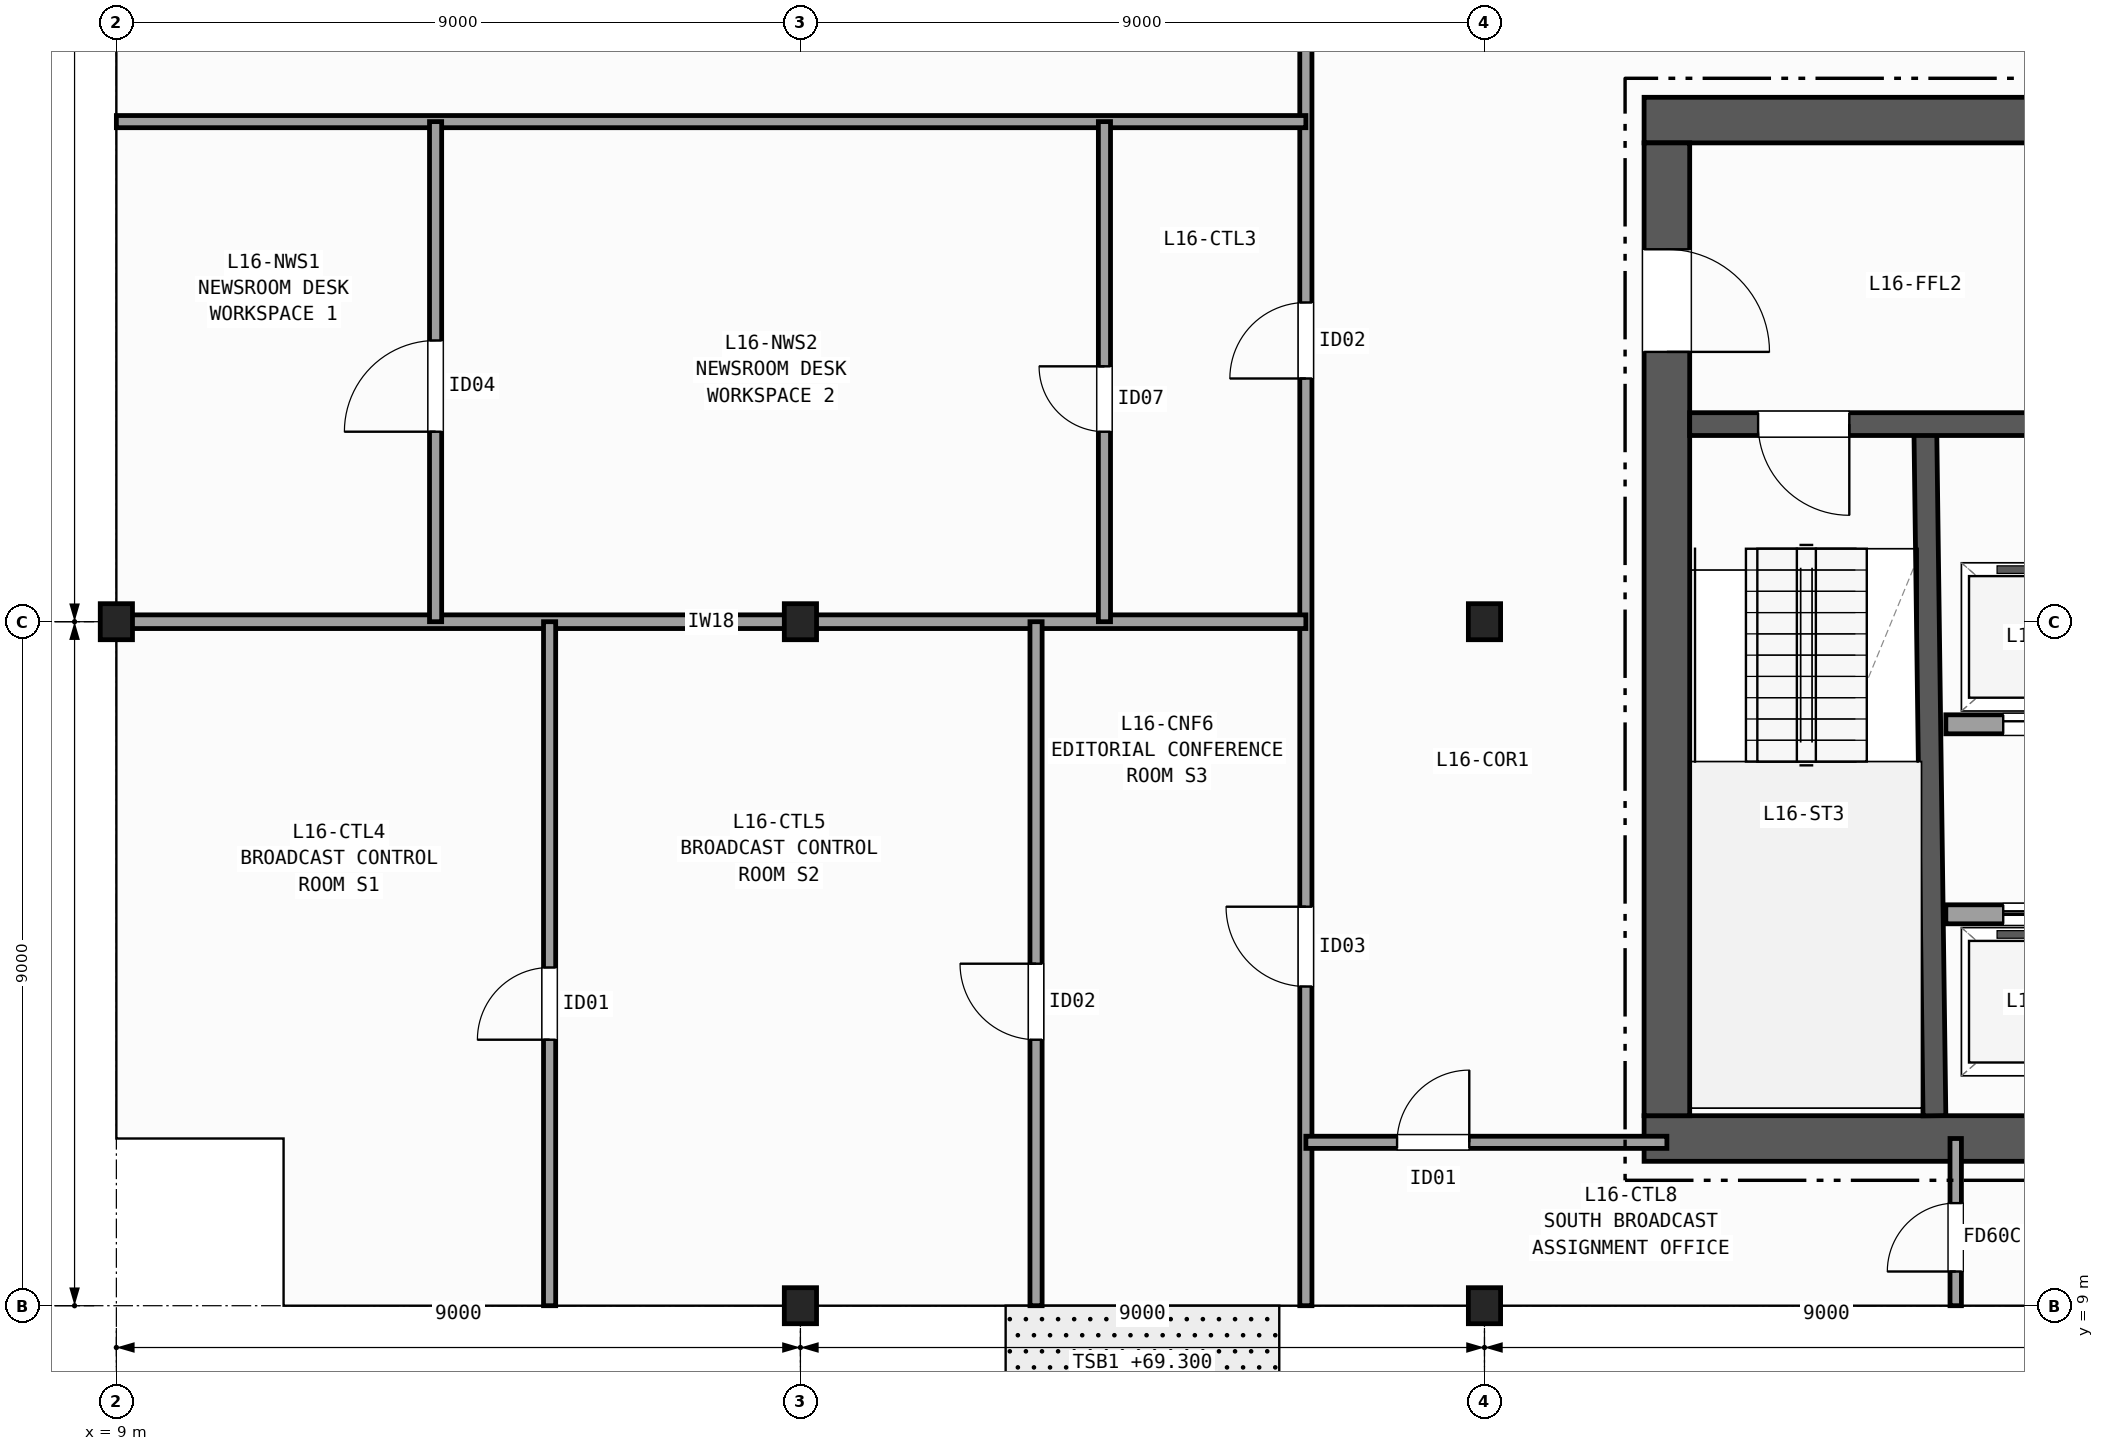
"""IFC4 building model, lengths in metres.
Left out: names, types, materials, properties, quantities, classifications, styles, units other than length and angle.
Written with IfcOpenShell. Run it as: python <this file> out.ifc"""

import sys

from ifc_helpers import new_model, si_unit, direction, frame, frame_2d, origin, origin_2d, place, context, subcontext, project, spatial, rectangle, i_section, extrude, element, fill, save


model = new_model("IFC4")
c1 = context("Model", 3, precision=1e-05, world=origin(), true_north=direction((0.0, 1.0)))
c2 = subcontext(c1, "Body", "Model", "MODEL_VIEW")
j1 = project(units=[si_unit("LENGTHUNIT", "METRE"), si_unit("PLANEANGLEUNIT", "RADIAN")], contexts=[c1])
p1 = place(None, origin())
s1 = spatial("IfcSite", under=j1, at=p1, CompositionType="ELEMENT")
p2 = place(p1, origin())
s2 = spatial("IfcBuilding", under=s1, at=p2, CompositionType="ELEMENT")
p3 = place(p2, frame((0.0, 0.0, 69.3)))
s3 = spatial("IfcBuildingStorey", under=s2, at=p3, CompositionType="ELEMENT", Elevation=69.3)
for number, where, z_axis, x_axis in (
    (1, (9.0, 18.0, 0.0), (0.0, 0.0, 1.0), (1.0, 0.0, 0.0)),
    (2, (18.0, 9.0, 0.0), (0.0, 0.0, 1.0), (1.0, 0.0, 0.0)),
    (3, (18.0, 18.0, 0.0), (0.0, 0.0, 1.0), (1.0, 0.0, 0.0)),
    (4, (27.0, 9.0, 0.0), (0.0, 0.0, 1.0), (1.0, 0.0, 0.0)),
    (5, (27.0, 18.0, 0.0), (0.0, 0.0, 1.0), (1.0, 0.0, 0.0)),
):
    element("IfcColumn", number, at=place(p3, frame(where, z_axis=z_axis, x_axis=x_axis)), inside=s3, PredefinedType="COLUMN", context=c2, shape_type="SweptSolid", body=[
        extrude(i_section(OverallWidth=0.424, OverallDepth=0.474, WebThickness=0.048, FlangeThickness=0.077, FilletRadius=0.015, at=origin_2d()), origin(), (0.0, 0.0, 1.0), 3.7),
    ])
p4 = place(p3, frame((29.1, 11.2, 0.0), z_axis=(0.0, 0.0, 1.0), x_axis=(1.0, 0.0, 0.0)))
e6 = element("IfcWall", 6, at=p4, inside=s3, PredefinedType="SHEAR", context=c2, shape_type="SweptSolid", body=[
    extrude(rectangle(XDim=14.0, YDim=0.6, at=frame_2d((7.0, 0.0))), origin(), (0.0, 0.0, 1.0), 3.42),
])
p5 = place(p3, frame((43.1, 24.6, 0.0), z_axis=(0.0, 0.0, 1.0), x_axis=(-1.0, 0.0, 0.0)))
e7 = element("IfcWall", 7, at=p5, inside=s3, PredefinedType="SHEAR", context=c2, shape_type="SweptSolid", body=[
    extrude(rectangle(XDim=14.0, YDim=0.6, at=frame_2d((7.0, 0.0))), origin(), (0.0, 0.0, 1.0), 3.42),
])
p6 = place(p5, frame((0.8, 0.0, 0.0)))
e8 = element("IfcOpeningElement", 8, at=p6, cuts=e7, PredefinedType="OPENING", context=c2, shape_type="SweptSolid", body=[
    extrude(rectangle(XDim=1.1, YDim=2.15, at=frame_2d((0.55, 1.075))), frame((0.0, 0.31, 0.0), z_axis=(0.0, -1.0, 0.0), x_axis=(1.0, 0.0, 0.0)), (0.0, 0.0, 1.0), 0.62),
])
p7 = place(p5, frame((2.3, 0.0, 0.0)))
e9 = element("IfcOpeningElement", 9, at=p7, cuts=e7, PredefinedType="OPENING", context=c2, shape_type="SweptSolid", body=[
    extrude(rectangle(XDim=0.9, YDim=2.1, at=frame_2d((0.45, 1.05))), frame((0.0, 0.31, 0.0), z_axis=(0.0, -1.0, 0.0), x_axis=(1.0, 0.0, 0.0)), (0.0, 0.0, 1.0), 0.62),
])
p8 = place(p5, frame((3.6, 0.0, 0.0)))
e10 = element("IfcOpeningElement", 10, at=p8, cuts=e7, PredefinedType="OPENING", context=c2, shape_type="SweptSolid", body=[
    extrude(rectangle(XDim=0.9, YDim=2.1, at=frame_2d((0.45, 1.05))), frame((0.0, 0.31, 0.0), z_axis=(0.0, -1.0, 0.0), x_axis=(1.0, 0.0, 0.0)), (0.0, 0.0, 1.0), 0.62),
])
p9 = place(p5, frame((4.95, 0.0, 0.0)))
e11 = element("IfcOpeningElement", 11, at=p9, cuts=e7, PredefinedType="OPENING", context=c2, shape_type="SweptSolid", body=[
    extrude(rectangle(XDim=0.9, YDim=2.1, at=frame_2d((0.45, 1.05))), frame((0.0, 0.31, 0.0), z_axis=(0.0, -1.0, 0.0), x_axis=(1.0, 0.0, 0.0)), (0.0, 0.0, 1.0), 0.62),
])
p10 = place(p3, frame((29.4, 24.3, 0.0), z_axis=(0.0, 0.0, 1.0), x_axis=(0.0, -1.0, 0.0)))
e12 = element("IfcWall", 12, at=p10, inside=s3, PredefinedType="SHEAR", context=c2, shape_type="SweptSolid", body=[
    extrude(rectangle(XDim=12.8, YDim=0.6, at=frame_2d((6.4, 0.0))), origin(), (0.0, 0.0, 1.0), 3.42),
])
p11 = place(p10, frame((1.4, 0.0, 0.0)))
e13 = element("IfcOpeningElement", 13, at=p11, cuts=e12, PredefinedType="OPENING", context=c2, shape_type="SweptSolid", body=[
    extrude(rectangle(XDim=1.35, YDim=2.15, at=frame_2d((0.675, 1.075))), frame((0.0, 0.31, 0.0), z_axis=(0.0, -1.0, 0.0), x_axis=(1.0, 0.0, 0.0)), (0.0, 0.0, 1.0), 0.62),
])
p12 = place(p3, frame((32.92, 11.5, 0.0), z_axis=(0.0, 0.0, 1.0), x_axis=(-0.013244407292, 0.999912288991, 0.0)))
e14 = element("IfcWall", 14, at=p12, inside=s3, PredefinedType="SHEAR", context=c2, shape_type="SweptSolid", body=[
    extrude(rectangle(XDim=9.051, YDim=0.3, at=frame_2d((4.525, 0.0))), origin(), (0.0, 0.0, 1.0), 3.42),
])
p13 = place(p3, frame((34.5, 20.6, 0.0), z_axis=(0.0, 0.0, 1.0), x_axis=(-1.0, 0.0, 0.0)))
e15 = element("IfcWall", 15, at=p13, inside=s3, PredefinedType="SHEAR", context=c2, shape_type="SweptSolid", body=[
    extrude(rectangle(XDim=4.8, YDim=0.3, at=frame_2d((2.4, 0.0))), origin(), (0.0, 0.0, 1.0), 3.42),
])
p14 = place(p13, frame((2.7, 0.0, 0.0)))
e16 = element("IfcOpeningElement", 16, at=p14, cuts=e15, PredefinedType="OPENING", context=c2, shape_type="SweptSolid", body=[
    extrude(rectangle(XDim=1.2, YDim=2.15, at=frame_2d((0.6, 1.075))), frame((0.0, 0.16, 0.0), z_axis=(0.0, -1.0, 0.0), x_axis=(1.0, 0.0, 0.0)), (0.0, 0.0, 1.0), 0.32),
])
p15 = place(p3, frame((33.07, 14.15, 0.0), z_axis=(0.0, 0.0, 1.0), x_axis=(1.0, 0.0, 0.0)))
e17 = element("IfcWall", 17, at=p15, inside=s3, PredefinedType="PARTITIONING", context=c2, shape_type="SweptSolid", body=[
    extrude(rectangle(XDim=9.43, YDim=0.25, at=frame_2d((4.715, 0.0))), origin(), (0.0, 0.0, 1.0), 3.42),
])
p16 = place(p15, frame((0.755, 0.0, 0.0)))
e18 = element("IfcOpeningElement", 18, at=p16, cuts=e17, PredefinedType="OPENING", context=c2, shape_type="SweptSolid", body=[
    extrude(rectangle(XDim=1.15, YDim=2.15, at=frame_2d((0.575, 1.075))), frame((0.0, 0.135, 0.0), z_axis=(0.0, -1.0, 0.0), x_axis=(1.0, 0.0, 0.0)), (0.0, 0.0, 1.0), 0.27),
])
p17 = place(p15, frame((3.355, 0.0, 0.0)))
e19 = element("IfcOpeningElement", 19, at=p17, cuts=e17, PredefinedType="OPENING", context=c2, shape_type="SweptSolid", body=[
    extrude(rectangle(XDim=1.15, YDim=2.15, at=frame_2d((0.575, 1.075))), frame((0.0, 0.135, 0.0), z_axis=(0.0, -1.0, 0.0), x_axis=(1.0, 0.0, 0.0)), (0.0, 0.0, 1.0), 0.27),
])
p18 = place(p3, frame((40.98, 16.65, 0.0), z_axis=(0.0, 0.0, 1.0), x_axis=(-1.0, 0.0, 0.0)))
e20 = element("IfcWall", 20, at=p18, inside=s3, PredefinedType="PARTITIONING", context=c2, shape_type="SweptSolid", body=[
    extrude(rectangle(XDim=7.91, YDim=0.25, at=frame_2d((3.955, 0.0))), origin(), (0.0, 0.0, 1.0), 3.42),
])
p19 = place(p18, frame((6.005, 0.0, 0.0)))
e21 = element("IfcOpeningElement", 21, at=p19, cuts=e20, PredefinedType="OPENING", context=c2, shape_type="SweptSolid", body=[
    extrude(rectangle(XDim=1.15, YDim=2.15, at=frame_2d((0.575, 1.075))), frame((0.0, 0.135, 0.0), z_axis=(0.0, -1.0, 0.0), x_axis=(1.0, 0.0, 0.0)), (0.0, 0.0, 1.0), 0.27),
])
p20 = place(p18, frame((3.405, 0.0, 0.0)))
e22 = element("IfcOpeningElement", 22, at=p20, cuts=e20, PredefinedType="OPENING", context=c2, shape_type="SweptSolid", body=[
    extrude(rectangle(XDim=1.15, YDim=2.15, at=frame_2d((0.575, 1.075))), frame((0.0, 0.135, 0.0), z_axis=(0.0, -1.0, 0.0), x_axis=(1.0, 0.0, 0.0)), (0.0, 0.0, 1.0), 0.27),
])
p21 = place(p3, frame((24.65, 9.0, 0.0), z_axis=(0.0, 0.0, 1.0), x_axis=(0.0, 1.0, 0.0)))
e23 = element("IfcWall", 23, at=p21, inside=s3, PredefinedType="PARTITIONING", context=c2, shape_type="SweptSolid", body=[
    extrude(rectangle(XDim=19.2, YDim=0.16, at=frame_2d((9.6, 0.0))), origin(), (0.0, 0.0, 1.0), 2.627),
])
p22 = place(p21, frame((12.2, 0.0, 0.0)))
e24 = element("IfcOpeningElement", 24, at=p22, cuts=e23, PredefinedType="OPENING", context=c2, shape_type="SweptSolid", body=[
    extrude(rectangle(XDim=1.0, YDim=2.1, at=frame_2d((0.5, 1.05))), frame((0.0, 0.09, 0.0), z_axis=(0.0, -1.0, 0.0), x_axis=(1.0, 0.0, 0.0)), (0.0, 0.0, 1.0), 0.18),
])
p23 = place(p21, frame((4.2, 0.0, 0.0)))
e25 = element("IfcOpeningElement", 25, at=p23, cuts=e23, PredefinedType="OPENING", context=c2, shape_type="SweptSolid", body=[
    extrude(rectangle(XDim=1.05, YDim=2.15, at=frame_2d((0.525, 1.075))), frame((0.0, 0.09, 0.0), z_axis=(0.0, -1.0, 0.0), x_axis=(1.0, 0.0, 0.0)), (0.0, 0.0, 1.0), 0.18),
])
p24 = place(p3, frame((9.0, 24.58, 0.0), z_axis=(0.0, 0.0, 1.0), x_axis=(1.0, 0.0, 0.0)))
e26 = element("IfcWall", 26, at=p24, inside=s3, PredefinedType="PARTITIONING", context=c2, shape_type="SweptSolid", body=[
    extrude(rectangle(XDim=15.65, YDim=0.16, at=frame_2d((7.825, 0.0))), origin(), (0.0, 0.0, 1.0), 2.627),
])
p25 = place(p3, frame((9.0, 18.0, 0.0), z_axis=(0.0, 0.0, 1.0), x_axis=(1.0, 0.0, 0.0)))
e27 = element("IfcWall", 27, at=p25, inside=s3, PredefinedType="PARTITIONING", context=c2, shape_type="SweptSolid", body=[
    extrude(rectangle(XDim=15.65, YDim=0.18, at=frame_2d((7.825, 0.0))), origin(), (0.0, 0.0, 1.0), 2.627),
])
p26 = place(p3, frame((13.2, 18.0, 0.0), z_axis=(0.0, 0.0, 1.0), x_axis=(0.0, 1.0, 0.0)))
e28 = element("IfcWall", 28, at=p26, inside=s3, PredefinedType="PARTITIONING", context=c2, shape_type="SweptSolid", body=[
    extrude(rectangle(XDim=6.58, YDim=0.16, at=frame_2d((3.29, 0.0))), origin(), (0.0, 0.0, 1.0), 2.789),
])
p27 = place(p26, frame((2.5, 0.0, 0.0)))
e29 = element("IfcOpeningElement", 29, at=p27, cuts=e28, PredefinedType="OPENING", context=c2, shape_type="SweptSolid", body=[
    extrude(rectangle(XDim=1.2, YDim=2.15, at=frame_2d((0.6, 1.075))), frame((0.0, 0.09, 0.0), z_axis=(0.0, -1.0, 0.0), x_axis=(1.0, 0.0, 0.0)), (0.0, 0.0, 1.0), 0.18),
])
p28 = place(p3, frame((22.0, 18.0, 0.0), z_axis=(0.0, 0.0, 1.0), x_axis=(0.0, 1.0, 0.0)))
e30 = element("IfcWall", 30, at=p28, inside=s3, PredefinedType="PARTITIONING", context=c2, shape_type="SweptSolid", body=[
    extrude(rectangle(XDim=6.58, YDim=0.16, at=frame_2d((3.29, 0.0))), origin(), (0.0, 0.0, 1.0), 2.789),
])
p29 = place(p28, frame((2.5, 0.0, 0.0)))
e31 = element("IfcOpeningElement", 31, at=p29, cuts=e30, PredefinedType="OPENING", context=c2, shape_type="SweptSolid", body=[
    extrude(rectangle(XDim=0.86, YDim=2.05, at=frame_2d((0.43, 1.025))), frame((0.0, 0.09, 0.0), z_axis=(0.0, -1.0, 0.0), x_axis=(1.0, 0.0, 0.0)), (0.0, 0.0, 1.0), 0.18),
])
p30 = place(p3, frame((14.7, 9.0, 0.0), z_axis=(0.0, 0.0, 1.0), x_axis=(0.0, 1.0, 0.0)))
e32 = element("IfcWall", 32, at=p30, inside=s3, PredefinedType="PARTITIONING", context=c2, shape_type="SweptSolid", body=[
    extrude(rectangle(XDim=9.0, YDim=0.16, at=frame_2d((4.5, 0.0))), origin(), (0.0, 0.0, 1.0), 2.789),
])
p31 = place(p30, frame((3.5, 0.0, 0.0)))
e33 = element("IfcOpeningElement", 33, at=p31, cuts=e32, PredefinedType="OPENING", context=c2, shape_type="SweptSolid", body=[
    extrude(rectangle(XDim=0.95, YDim=2.1, at=frame_2d((0.475, 1.05))), frame((0.0, 0.09, 0.0), z_axis=(0.0, -1.0, 0.0), x_axis=(1.0, 0.0, 0.0)), (0.0, 0.0, 1.0), 0.18),
])
p32 = place(p3, frame((21.1, 9.0, 0.0), z_axis=(0.0, 0.0, 1.0), x_axis=(0.0, 1.0, 0.0)))
e34 = element("IfcWall", 34, at=p32, inside=s3, PredefinedType="PARTITIONING", context=c2, shape_type="SweptSolid", body=[
    extrude(rectangle(XDim=9.0, YDim=0.16, at=frame_2d((4.5, 0.0))), origin(), (0.0, 0.0, 1.0), 2.627),
])
p33 = place(p32, frame((3.5, 0.0, 0.0)))
e35 = element("IfcOpeningElement", 35, at=p33, cuts=e34, PredefinedType="OPENING", context=c2, shape_type="SweptSolid", body=[
    extrude(rectangle(XDim=1.0, YDim=2.1, at=frame_2d((0.5, 1.05))), frame((0.0, 0.09, 0.0), z_axis=(0.0, -1.0, 0.0), x_axis=(1.0, 0.0, 0.0)), (0.0, 0.0, 1.0), 0.18),
])
p34 = place(p3, frame((24.65, 11.15, 0.0), z_axis=(0.0, 0.0, 1.0), x_axis=(1.0, 0.0, 0.0)))
e36 = element("IfcWall", 36, at=p34, inside=s3, PredefinedType="PARTITIONING", context=c2, shape_type="SweptSolid", body=[
    extrude(rectangle(XDim=4.75, YDim=0.16, at=frame_2d((2.375, 0.0))), origin(), (0.0, 0.0, 1.0), 2.792),
])
p35 = place(p34, frame((1.2, 0.0, 0.0)))
e37 = element("IfcOpeningElement", 37, at=p35, cuts=e36, PredefinedType="OPENING", context=c2, shape_type="SweptSolid", body=[
    extrude(rectangle(XDim=0.95, YDim=2.1, at=frame_2d((0.475, 1.05))), frame((0.0, 0.09, 0.0), z_axis=(0.0, -1.0, 0.0), x_axis=(1.0, 0.0, 0.0)), (0.0, 0.0, 1.0), 0.18),
])
p36 = place(p3, frame((33.2, 9.0, 0.0), z_axis=(0.0, 0.0, 1.0), x_axis=(0.0, 1.0, 0.0)))
e38 = element("IfcWall", 38, at=p36, inside=s3, PredefinedType="PARTITIONING", context=c2, shape_type="SweptSolid", body=[
    extrude(rectangle(XDim=2.2, YDim=0.15, at=frame_2d((1.1, 0.0))), origin(), (0.0, 0.0, 1.0), 2.627),
])
p37 = place(p36, frame((0.45, 0.0, 0.0)))
e39 = element("IfcOpeningElement", 39, at=p37, cuts=e38, PredefinedType="OPENING", context=c2, shape_type="SweptSolid", body=[
    extrude(rectangle(XDim=0.9, YDim=2.1, at=frame_2d((0.45, 1.05))), frame((0.0, 0.085, 0.0), z_axis=(0.0, -1.0, 0.0), x_axis=(1.0, 0.0, 0.0)), (0.0, 0.0, 1.0), 0.17),
])
p38 = place(p14, origin())
e40 = element("IfcDoor", 40, at=p38, inside=s3, OperationType="SINGLE_SWING_LEFT", PredefinedType="DOOR", context=c2, shape_type="SweptSolid", body=[
    extrude(rectangle(XDim=1.2, YDim=2.15, at=frame_2d((0.6, 1.075))), frame((0.0, 0.025, 0.0), z_axis=(0.0, -1.0, 0.0), x_axis=(1.0, 0.0, 0.0)), (0.0, 0.0, 1.0), 0.05),
])
fill(e16, e40)
p39 = place(p11, origin())
e41 = element("IfcDoor", 41, at=p39, inside=s3, OperationType="SINGLE_SWING_RIGHT", PredefinedType="DOOR", context=c2, shape_type="SweptSolid", body=[
    extrude(rectangle(XDim=1.35, YDim=2.15, at=frame_2d((0.675, 1.075))), frame((0.0, 0.025, 0.0), z_axis=(0.0, -1.0, 0.0), x_axis=(1.0, 0.0, 0.0)), (0.0, 0.0, 1.0), 0.05),
])
fill(e13, e41)
p40 = place(p16, origin())
e42 = element("IfcDoor", 42, at=p40, inside=s3, OperationType="DOUBLE_DOOR_SLIDING", PredefinedType="DOOR", context=c2, shape_type="SweptSolid", body=[
    extrude(rectangle(XDim=1.15, YDim=2.15, at=frame_2d((0.575, 1.075))), frame((0.0, 0.025, 0.0), z_axis=(0.0, -1.0, 0.0), x_axis=(1.0, 0.0, 0.0)), (0.0, 0.0, 1.0), 0.05),
])
fill(e18, e42)
p41 = place(p19, origin())
e43 = element("IfcDoor", 43, at=p41, inside=s3, OperationType="DOUBLE_DOOR_SLIDING", PredefinedType="DOOR", context=c2, shape_type="SweptSolid", body=[
    extrude(rectangle(XDim=1.15, YDim=2.15, at=frame_2d((0.575, 1.075))), frame((0.0, 0.025, 0.0), z_axis=(0.0, -1.0, 0.0), x_axis=(1.0, 0.0, 0.0)), (0.0, 0.0, 1.0), 0.05),
])
fill(e21, e43)
p42 = place(p22, origin())
e44 = element("IfcDoor", 44, at=p42, inside=s3, OperationType="SINGLE_SWING_LEFT", PredefinedType="DOOR", context=c2, shape_type="SweptSolid", body=[
    extrude(rectangle(XDim=1.0, YDim=2.1, at=frame_2d((0.5, 1.05))), frame((0.0, 0.025, 0.0), z_axis=(0.0, -1.0, 0.0), x_axis=(1.0, 0.0, 0.0)), (0.0, 0.0, 1.0), 0.05),
])
fill(e24, e44)
p43 = place(p23, origin())
e45 = element("IfcDoor", 45, at=p43, inside=s3, OperationType="SINGLE_SWING_RIGHT", PredefinedType="DOOR", context=c2, shape_type="SweptSolid", body=[
    extrude(rectangle(XDim=1.05, YDim=2.15, at=frame_2d((0.525, 1.075))), frame((0.0, 0.025, 0.0), z_axis=(0.0, -1.0, 0.0), x_axis=(1.0, 0.0, 0.0)), (0.0, 0.0, 1.0), 0.05),
])
fill(e25, e45)
p44 = place(p27, origin())
e46 = element("IfcDoor", 46, at=p44, inside=s3, OperationType="SINGLE_SWING_LEFT", PredefinedType="DOOR", context=c2, shape_type="SweptSolid", body=[
    extrude(rectangle(XDim=1.2, YDim=2.15, at=frame_2d((0.6, 1.075))), frame((0.0, 0.025, 0.0), z_axis=(0.0, -1.0, 0.0), x_axis=(1.0, 0.0, 0.0)), (0.0, 0.0, 1.0), 0.05),
])
fill(e29, e46)
p45 = place(p29, origin())
e47 = element("IfcDoor", 47, at=p45, inside=s3, OperationType="SINGLE_SWING_RIGHT", PredefinedType="DOOR", context=c2, shape_type="SweptSolid", body=[
    extrude(rectangle(XDim=0.86, YDim=2.05, at=frame_2d((0.43, 1.025))), frame((0.0, 0.025, 0.0), z_axis=(0.0, -1.0, 0.0), x_axis=(1.0, 0.0, 0.0)), (0.0, 0.0, 1.0), 0.05),
])
fill(e31, e47)
p46 = place(p31, origin())
e48 = element("IfcDoor", 48, at=p46, inside=s3, OperationType="SINGLE_SWING_LEFT", PredefinedType="DOOR", context=c2, shape_type="SweptSolid", body=[
    extrude(rectangle(XDim=0.95, YDim=2.1, at=frame_2d((0.475, 1.05))), frame((0.0, 0.025, 0.0), z_axis=(0.0, -1.0, 0.0), x_axis=(1.0, 0.0, 0.0)), (0.0, 0.0, 1.0), 0.05),
])
fill(e33, e48)
p47 = place(p33, origin())
e49 = element("IfcDoor", 49, at=p47, inside=s3, OperationType="SINGLE_SWING_RIGHT", PredefinedType="DOOR", context=c2, shape_type="SweptSolid", body=[
    extrude(rectangle(XDim=1.0, YDim=2.1, at=frame_2d((0.5, 1.05))), frame((0.0, 0.025, 0.0), z_axis=(0.0, -1.0, 0.0), x_axis=(1.0, 0.0, 0.0)), (0.0, 0.0, 1.0), 0.05),
])
fill(e35, e49)
p48 = place(p35, origin())
e50 = element("IfcDoor", 50, at=p48, inside=s3, OperationType="SINGLE_SWING_RIGHT", PredefinedType="DOOR", context=c2, shape_type="SweptSolid", body=[
    extrude(rectangle(XDim=0.95, YDim=2.1, at=frame_2d((0.475, 1.05))), frame((0.0, 0.025, 0.0), z_axis=(0.0, -1.0, 0.0), x_axis=(1.0, 0.0, 0.0)), (0.0, 0.0, 1.0), 0.05),
])
fill(e37, e50)
p49 = place(p37, origin())
e51 = element("IfcDoor", 51, at=p49, inside=s3, OperationType="SINGLE_SWING_LEFT", PredefinedType="DOOR", context=c2, shape_type="SweptSolid", body=[
    extrude(rectangle(XDim=0.9, YDim=2.1, at=frame_2d((0.45, 1.05))), frame((0.0, 0.025, 0.0), z_axis=(0.0, -1.0, 0.0), x_axis=(1.0, 0.0, 0.0)), (0.0, 0.0, 1.0), 0.05),
])
fill(e39, e51)
save(model, sys.argv[1])
